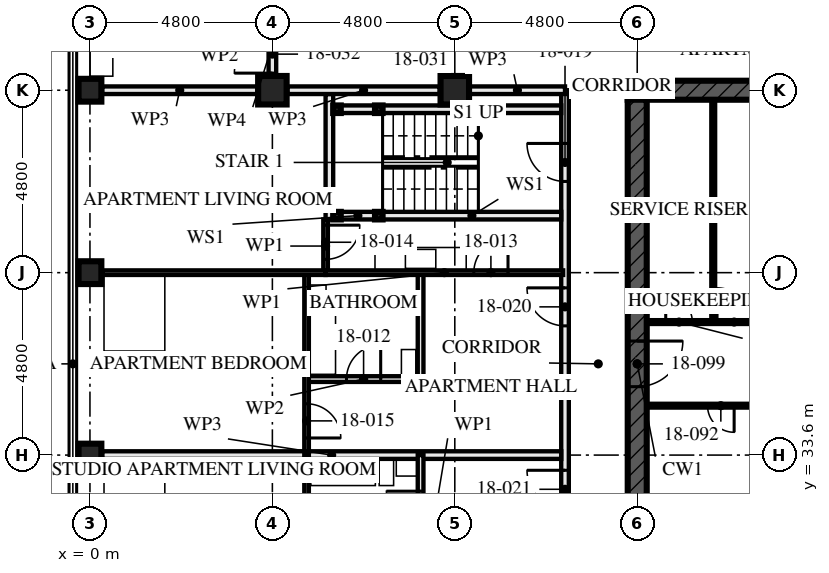
"""IFC4 building model, lengths in metres.
Left out: names, types, materials, properties, quantities, classifications, styles, units other than length and angle.
Written with IfcOpenShell. Run it as: python <this file> out.ifc"""

import sys

from ifc_helpers import new_model, si_unit, direction, frame, frame_2d, origin, origin_2d, place, context, subcontext, project, spatial, rectangle, hollow_rectangle, extrude, element, fill, save


model = new_model("IFC4")
c1 = context("Model", 3, precision=1e-05, world=origin(), true_north=direction((0.0, 1.0)))
c2 = subcontext(c1, "Body", "Model", "MODEL_VIEW")
j1 = project(units=[si_unit("LENGTHUNIT", "METRE"), si_unit("PLANEANGLEUNIT", "RADIAN")], contexts=[c1])
p1 = place(None, origin())
s1 = spatial("IfcSite", under=j1, at=p1, CompositionType="ELEMENT")
p2 = place(p1, origin())
s2 = spatial("IfcBuilding", under=s1, at=p2, CompositionType="ELEMENT")
p3 = place(p2, frame((0.0, 0.0, 69.0)))
s3 = spatial("IfcBuildingStorey", under=s2, at=p3, CompositionType="ELEMENT", Elevation=69.0)
for number, where, z_axis, x_axis in (
    (1, (0.0, 33.6, 0.0), (0.0, 0.0, 1.0), (1.0, 0.0, 0.0)),
    (2, (0.0, 38.4, 0.0), (0.0, 0.0, 1.0), (1.0, 0.0, 0.0)),
    (3, (0.0, 43.2, 0.0), (0.0, 0.0, 1.0), (0.0, 1.0, 0.0)),
):
    element("IfcColumn", number, at=place(p3, frame(where, z_axis=z_axis, x_axis=x_axis)), inside=s3, PredefinedType="COLUMN", context=c2, shape_type="SweptSolid", body=[
        extrude(hollow_rectangle(XDim=0.6, YDim=0.6, WallThickness=0.08, at=origin_2d()), origin(), (0.0, 0.0, 1.0), 3.5),
    ])
for number, where, z_axis, x_axis in (
    (4, (4.8, 43.2, 0.0), (0.0, 0.0, 1.0), (0.0, 1.0, 0.0)),
    (5, (9.6, 43.2, 0.0), (0.0, 0.0, 1.0), (0.0, 1.0, 0.0)),
):
    element("IfcColumn", number, at=place(p3, frame(where, z_axis=z_axis, x_axis=x_axis)), inside=s3, PredefinedType="COLUMN", context=c2, shape_type="SweptSolid", body=[
        extrude(hollow_rectangle(XDim=0.75, YDim=0.75, WallThickness=0.08, at=origin_2d()), origin(), (0.0, 0.0, 1.0), 3.5),
    ])
p4 = place(p3, frame((29.05, 43.2, -0.17), z_axis=(0.0, 0.0, 1.0), x_axis=(-1.0, 0.0, 0.0)))
e6 = element("IfcWall", 6, at=p4, inside=s3, PredefinedType="SHEAR", context=c2, shape_type="SweptSolid", body=[
    extrude(rectangle(XDim=14.9, YDim=0.5, at=frame_2d((7.45, 0.0))), origin(), (0.0, 0.0, 1.0), 3.5),
])
p5 = place(p4, frame((6.85, 0.0, 0.17)))
e7 = element("IfcOpeningElement", 7, at=p5, cuts=e6, PredefinedType="OPENING", context=c2, shape_type="SweptSolid", body=[
    extrude(rectangle(XDim=1.2, YDim=2.1, at=frame_2d((0.6, 1.05))), frame((0.0, 0.26, 0.0), z_axis=(0.0, -1.0, 0.0), x_axis=(1.0, 0.0, 0.0)), (0.0, 0.0, 1.0), 0.521),
])
p6 = place(p3, frame((14.4, 42.95, -0.17), z_axis=(0.0, 0.0, 1.0), x_axis=(0.0, -1.0, 0.0)))
e8 = element("IfcWall", 8, at=p6, inside=s3, PredefinedType="SHEAR", context=c2, shape_type="SweptSolid", body=[
    extrude(rectangle(XDim=13.9, YDim=0.5, at=frame_2d((6.95, 0.0))), origin(), (0.0, 0.0, 1.0), 3.5),
])
p7 = place(p6, frame((6.35, 0.0, 0.17)))
e9 = element("IfcOpeningElement", 9, at=p7, cuts=e8, PredefinedType="OPENING", context=c2, shape_type="SweptSolid", body=[
    extrude(rectangle(XDim=1.2, YDim=2.1, at=frame_2d((0.6, 1.05))), frame((0.0, 0.26, 0.0), z_axis=(0.0, -1.0, 0.0), x_axis=(1.0, 0.0, 0.0)), (0.0, 0.0, 1.0), 0.521),
])
for number, where, z_axis, x_axis in (
    (10, (6.5, 42.7, 0.0), (0.0, 0.0, 1.0), (1.0, 0.0, 0.0)),
    (11, (6.5, 39.9, 0.0), (0.0, 0.0, 1.0), (1.0, 0.0, 0.0)),
    (12, (7.6, 42.7, 0.0), (0.0, 0.0, 1.0), (1.0, 0.0, 0.0)),
    (13, (7.6, 39.9, 0.0), (0.0, 0.0, 1.0), (1.0, 0.0, 0.0)),
):
    element("IfcColumn", number, at=place(p3, frame(where, z_axis=z_axis, x_axis=x_axis)), inside=s3, PredefinedType="COLUMN", context=c2, shape_type="SweptSolid", body=[
        extrude(hollow_rectangle(XDim=0.2, YDim=0.2, WallThickness=0.008, at=origin_2d()), origin(), (0.0, 0.0, 1.0), 3.33),
    ])
p8 = place(p3, frame((6.6, 42.7, 0.0), z_axis=(0.0, 0.0, 1.0), x_axis=(1.0, 0.0, 0.0)))
e14 = element("IfcWall", 14, at=p8, inside=s3, PredefinedType="SOLIDWALL", context=c2, shape_type="SweptSolid", body=[
    extrude(rectangle(XDim=0.9, YDim=0.2, at=frame_2d((0.45, 0.0))), origin(), (0.0, 0.0, 1.0), 2.99),
])
p9 = place(p3, frame((7.7, 42.7, 0.0), z_axis=(0.0, 0.0, 1.0), x_axis=(1.0, 0.0, 0.0)))
e15 = element("IfcWall", 15, at=p9, inside=s3, PredefinedType="SOLIDWALL", context=c2, shape_type="SweptSolid", body=[
    extrude(rectangle(XDim=4.7, YDim=0.2, at=frame_2d((2.35, 0.0))), origin(), (0.0, 0.0, 1.0), 2.99),
])
p10 = place(p3, frame((6.6, 39.9, 0.0), z_axis=(0.0, 0.0, 1.0), x_axis=(1.0, 0.0, 0.0)))
e16 = element("IfcWall", 16, at=p10, inside=s3, PredefinedType="SOLIDWALL", context=c2, shape_type="SweptSolid", body=[
    extrude(rectangle(XDim=0.9, YDim=0.2, at=frame_2d((0.45, 0.0))), origin(), (0.0, 0.0, 1.0), 2.99),
])
p11 = place(p3, frame((7.7, 39.9, 0.0), z_axis=(0.0, 0.0, 1.0), x_axis=(1.0, 0.0, 0.0)))
e17 = element("IfcWall", 17, at=p11, inside=s3, PredefinedType="SOLIDWALL", context=c2, shape_type="SweptSolid", body=[
    extrude(rectangle(XDim=4.7, YDim=0.2, at=frame_2d((2.35, 0.0))), origin(), (0.0, 0.0, 1.0), 2.99),
])
p12 = place(p3, frame((6.3, 43.1, 0.0), z_axis=(0.0, 0.0, 1.0), x_axis=(0.0, -1.0, 0.0)))
e18 = element("IfcWall", 18, at=p12, inside=s3, PredefinedType="SOLIDWALL", context=c2, shape_type="SweptSolid", body=[
    extrude(rectangle(XDim=3.3, YDim=0.2, at=frame_2d((1.65, 0.0))), origin(), (0.0, 0.0, 1.0), 3.33),
])
p13 = place(p3, frame((5.7, 35.6, 0.0), z_axis=(0.0, 0.0, 1.0), x_axis=(1.0, 0.0, 0.0)))
e19 = element("IfcWall", 19, at=p13, inside=s3, PredefinedType="PARTITIONING", context=c2, shape_type="SweptSolid", body=[
    extrude(rectangle(XDim=3.0, YDim=0.15, at=frame_2d((1.5, 0.0))), origin(), (0.0, 0.0, 1.0), 3.33),
])
p14 = place(p13, frame((1.05, 0.0, 0.0)))
e20 = element("IfcOpeningElement", 20, at=p14, cuts=e19, PredefinedType="OPENING", context=c2, shape_type="SweptSolid", body=[
    extrude(rectangle(XDim=0.9, YDim=2.1, at=frame_2d((0.45, 1.05))), frame((0.0, 0.085, 0.0), z_axis=(0.0, -1.0, 0.0), x_axis=(1.0, 0.0, 0.0)), (0.0, 0.0, 1.0), 0.171),
])
p15 = place(p3, frame((8.7, 38.4, 0.0), z_axis=(0.0, 0.0, 1.0), x_axis=(0.0, -1.0, 0.0)))
e21 = element("IfcWall", 21, at=p15, inside=s3, PredefinedType="PARTITIONING", context=c2, shape_type="SweptSolid", body=[
    extrude(rectangle(XDim=2.8, YDim=0.15, at=frame_2d((1.4, 0.0))), origin(), (0.0, 0.0, 1.0), 3.33),
])
p16 = place(p3, frame((6.2, 38.4, 0.0), z_axis=(0.0, 0.0, 1.0), x_axis=(1.0, 0.0, 0.0)))
e22 = element("IfcWall", 22, at=p16, inside=s3, PredefinedType="PARTITIONING", context=c2, shape_type="SweptSolid", body=[
    extrude(rectangle(XDim=6.25, YDim=0.12, at=frame_2d((3.125, 0.0))), origin(), (0.0, 0.0, 1.0), 2.55),
])
p17 = place(p16, frame((3.9, 0.0, 0.0)))
e23 = element("IfcOpeningElement", 23, at=p17, cuts=e22, PredefinedType="OPENING", context=c2, shape_type="SweptSolid", body=[
    extrude(rectangle(XDim=0.9, YDim=2.1, at=frame_2d((0.45, 1.05))), frame((0.0, 0.071, 0.0), z_axis=(0.0, -1.0, 0.0), x_axis=(1.0, 0.0, 0.0)), (0.0, 0.0, 1.0), 0.141),
])
p18 = place(p3, frame((6.2, 39.8, 0.0), z_axis=(0.0, 0.0, 1.0), x_axis=(0.0, -1.0, 0.0)))
e24 = element("IfcWall", 24, at=p18, inside=s3, PredefinedType="PARTITIONING", context=c2, shape_type="SweptSolid", body=[
    extrude(rectangle(XDim=1.4, YDim=0.12, at=frame_2d((0.7, 0.0))), origin(), (0.0, 0.0, 1.0), 3.33),
])
p19 = place(p18, frame((0.15, 0.0, 0.0)))
e25 = element("IfcOpeningElement", 25, at=p19, cuts=e24, PredefinedType="OPENING", context=c2, shape_type="SweptSolid", body=[
    extrude(rectangle(XDim=0.9, YDim=2.1, at=frame_2d((0.45, 1.05))), frame((0.0, 0.071, 0.0), z_axis=(0.0, -1.0, 0.0), x_axis=(1.0, 0.0, 0.0)), (0.0, 0.0, 1.0), 0.141),
])
p20 = place(p3, frame((5.7, 38.4, 0.0), z_axis=(0.0, 0.0, 1.0), x_axis=(0.0, -1.0, 0.0)))
e26 = element("IfcWall", 26, at=p20, inside=s3, PredefinedType="PARTITIONING", context=c2, shape_type="SweptSolid", body=[
    extrude(rectangle(XDim=4.8, YDim=0.12, at=frame_2d((2.4, 0.0))), origin(), (0.0, 0.0, 1.0), 3.33),
])
p21 = place(p20, frame((3.45, 0.0, 0.0)))
e27 = element("IfcOpeningElement", 27, at=p21, cuts=e26, PredefinedType="OPENING", context=c2, shape_type="SweptSolid", body=[
    extrude(rectangle(XDim=0.9, YDim=2.1, at=frame_2d((0.45, 1.05))), frame((0.0, 0.071, 0.0), z_axis=(0.0, -1.0, 0.0), x_axis=(1.0, 0.0, 0.0)), (0.0, 0.0, 1.0), 0.141),
])
p22 = place(p3, frame((0.32, 38.4, 0.0), z_axis=(0.0, 0.0, 1.0), x_axis=(1.0, 0.0, 0.0)))
e28 = element("IfcWall", 28, at=p22, inside=s3, PredefinedType="PARTITIONING", context=c2, shape_type="SweptSolid", body=[
    extrude(rectangle(XDim=5.88, YDim=0.12, at=frame_2d((2.94, 0.0))), origin(), (0.0, 0.0, 1.0), 2.55),
])
p23 = place(p3, frame((0.32, 33.6, 0.0), z_axis=(0.0, 0.0, 1.0), x_axis=(1.0, 0.0, 0.0)))
e29 = element("IfcWall", 29, at=p23, inside=s3, PredefinedType="PARTITIONING", context=c2, shape_type="SweptSolid", body=[
    extrude(rectangle(XDim=12.08, YDim=0.2, at=frame_2d((6.04, 0.0))), origin(), (0.0, 0.0, 1.0), 2.55),
])
p24 = place(p3, frame((8.7, 33.6, 0.0), z_axis=(0.0, 0.0, 1.0), x_axis=(0.0, -1.0, 0.0)))
e30 = element("IfcWall", 30, at=p24, inside=s3, PredefinedType="PARTITIONING", context=c2, shape_type="SweptSolid", body=[
    extrude(rectangle(XDim=2.8, YDim=0.15, at=frame_2d((1.4, 0.0))), origin(), (0.0, 0.0, 1.0), 3.33),
])
p25 = place(p24, frame((0.95, 0.0, 0.0)))
e31 = element("IfcOpeningElement", 31, at=p25, cuts=e30, PredefinedType="OPENING", context=c2, shape_type="SweptSolid", body=[
    extrude(rectangle(XDim=0.9, YDim=2.1, at=frame_2d((0.45, 1.05))), frame((0.0, 0.085, 0.0), z_axis=(0.0, -1.0, 0.0), x_axis=(1.0, 0.0, 0.0)), (0.0, 0.0, 1.0), 0.171),
])
p26 = place(p3, frame((5.7, 33.6, 0.0), z_axis=(0.0, 0.0, 1.0), x_axis=(0.0, -1.0, 0.0)))
e32 = element("IfcWall", 32, at=p26, inside=s3, PredefinedType="PARTITIONING", context=c2, shape_type="SweptSolid", body=[
    extrude(rectangle(XDim=4.8, YDim=0.12, at=frame_2d((2.4, 0.0))), origin(), (0.0, 0.0, 1.0), 3.33),
])
p27 = place(p26, frame((3.45, 0.0, 0.0)))
e33 = element("IfcOpeningElement", 33, at=p27, cuts=e32, PredefinedType="OPENING", context=c2, shape_type="SweptSolid", body=[
    extrude(rectangle(XDim=0.9, YDim=2.1, at=frame_2d((0.45, 1.05))), frame((0.0, 0.071, 0.0), z_axis=(0.0, -1.0, 0.0), x_axis=(1.0, 0.0, 0.0)), (0.0, 0.0, 1.0), 0.141),
])
p28 = place(p3, frame((12.5, 43.2, 0.0), z_axis=(0.0, 0.0, 1.0), x_axis=(0.0, -1.0, 0.0)))
e34 = element("IfcWall", 34, at=p28, inside=s3, PredefinedType="PARTITIONING", context=c2, shape_type="SweptSolid", body=[
    extrude(rectangle(XDim=14.4, YDim=0.2, at=frame_2d((7.2, 0.0))), origin(), (0.0, 0.0, 1.0), 2.55),
])
p29 = place(p28, frame((1.4, 0.0, 0.0)))
e35 = element("IfcOpeningElement", 35, at=p29, cuts=e34, PredefinedType="OPENING", context=c2, shape_type="SweptSolid", body=[
    extrude(rectangle(XDim=1.0, YDim=2.1, at=frame_2d((0.5, 1.05))), frame((0.0, 0.111, 0.0), z_axis=(0.0, -1.0, 0.0), x_axis=(1.0, 0.0, 0.0)), (0.0, 0.0, 1.0), 0.221),
])
p30 = place(p28, frame((5.2, 0.0, 0.0)))
e36 = element("IfcOpeningElement", 36, at=p30, cuts=e34, PredefinedType="OPENING", context=c2, shape_type="SweptSolid", body=[
    extrude(rectangle(XDim=1.0, YDim=2.1, at=frame_2d((0.5, 1.05))), frame((0.0, 0.111, 0.0), z_axis=(0.0, -1.0, 0.0), x_axis=(1.0, 0.0, 0.0)), (0.0, 0.0, 1.0), 0.221),
])
p31 = place(p28, frame((10.0, 0.0, 0.0)))
e37 = element("IfcOpeningElement", 37, at=p31, cuts=e34, PredefinedType="OPENING", context=c2, shape_type="SweptSolid", body=[
    extrude(rectangle(XDim=1.0, YDim=2.1, at=frame_2d((0.5, 1.05))), frame((0.0, 0.111, 0.0), z_axis=(0.0, -1.0, 0.0), x_axis=(1.0, 0.0, 0.0)), (0.0, 0.0, 1.0), 0.221),
])
p32 = place(p3, frame((4.8, 45.2, 0.0), z_axis=(0.0, 0.0, 1.0), x_axis=(0.0, -1.0, 0.0)))
e38 = element("IfcWall", 38, at=p32, inside=s3, PredefinedType="PARTITIONING", context=c2, shape_type="SweptSolid", body=[
    extrude(rectangle(XDim=1.605, YDim=0.2, at=frame_2d((0.802, 0.0))), origin(), (0.0, 0.0, 1.0), 3.33),
])
p33 = place(p32, frame((0.55, 0.0, 0.0)))
e39 = element("IfcOpeningElement", 39, at=p33, cuts=e38, PredefinedType="OPENING", context=c2, shape_type="SweptSolid", body=[
    extrude(rectangle(XDim=1.0, YDim=2.1, at=frame_2d((0.5, 1.05))), frame((0.0, 0.111, 0.0), z_axis=(0.0, -1.0, 0.0), x_axis=(1.0, 0.0, 0.0)), (0.0, 0.0, 1.0), 0.221),
])
p34 = place(p3, frame((16.4, 37.15, 0.0), z_axis=(0.0, 0.0, 1.0), x_axis=(0.0, 1.0, 0.0)))
e40 = element("IfcWall", 40, at=p34, inside=s3, PredefinedType="SOLIDWALL", context=c2, shape_type="SweptSolid", body=[
    extrude(rectangle(XDim=5.8, YDim=0.1, at=frame_2d((2.9, 0.0))), origin(), (0.0, 0.0, 1.0), 3.33),
])
p35 = place(p3, frame((14.65, 34.9, 0.0), z_axis=(0.0, 0.0, 1.0), x_axis=(1.0, 0.0, 0.0)))
e41 = element("IfcWall", 41, at=p35, inside=s3, PredefinedType="SOLIDWALL", context=c2, shape_type="SweptSolid", body=[
    extrude(rectangle(XDim=5.9, YDim=0.1, at=frame_2d((2.95, 0.0))), origin(), (0.0, 0.0, 1.0), 3.33),
])
p36 = place(p35, frame((1.6, 0.0, 0.0)))
e42 = element("IfcOpeningElement", 42, at=p36, cuts=e41, PredefinedType="OPENING", context=c2, shape_type="SweptSolid", body=[
    extrude(rectangle(XDim=0.7, YDim=2.1, at=frame_2d((0.35, 1.05))), frame((0.0, 0.061, 0.0), z_axis=(0.0, -1.0, 0.0), x_axis=(1.0, 0.0, 0.0)), (0.0, 0.0, 1.0), 0.121),
])
p37 = place(p3, frame((14.65, 37.1, 0.0), z_axis=(0.0, 0.0, 1.0), x_axis=(1.0, 0.0, 0.0)))
e43 = element("IfcWall", 43, at=p37, inside=s3, PredefinedType="SOLIDWALL", context=c2, shape_type="SweptSolid", body=[
    extrude(rectangle(XDim=5.9, YDim=0.1, at=frame_2d((2.95, 0.0))), origin(), (0.0, 0.0, 1.0), 3.33),
])
p38 = place(p37, frame((0.5, 0.0, 0.0)))
e44 = element("IfcOpeningElement", 44, at=p38, cuts=e43, PredefinedType="OPENING", context=c2, shape_type="SweptSolid", body=[
    extrude(rectangle(XDim=0.7, YDim=2.1, at=frame_2d((0.35, 1.05))), frame((0.0, 0.061, 0.0), z_axis=(0.0, -1.0, 0.0), x_axis=(1.0, 0.0, 0.0)), (0.0, 0.0, 1.0), 0.121),
])
p39 = place(p37, frame((1.85, 0.0, 0.0)))
e45 = element("IfcOpeningElement", 45, at=p39, cuts=e43, PredefinedType="OPENING", context=c2, shape_type="SweptSolid", body=[
    extrude(rectangle(XDim=0.9, YDim=2.1, at=frame_2d((0.45, 1.05))), frame((0.0, 0.061, 0.0), z_axis=(0.0, -1.0, 0.0), x_axis=(1.0, 0.0, 0.0)), (0.0, 0.0, 1.0), 0.121),
])
p40 = place(p3, frame((12.5, 43.2, 0.0), z_axis=(0.0, 0.0, 1.0), x_axis=(-1.0, 0.0, 0.0)))
e46 = element("IfcWall", 46, at=p40, inside=s3, PredefinedType="PARTITIONING", context=c2, shape_type="SweptSolid", body=[
    extrude(rectangle(XDim=2.505, YDim=0.2, at=frame_2d((1.252, 0.0))), origin(), (0.0, 0.0, 1.0), 2.32),
])
p41 = place(p3, frame((9.205, 43.2, 0.0), z_axis=(0.0, 0.0, 1.0), x_axis=(-1.0, 0.0, 0.0)))
e47 = element("IfcWall", 47, at=p41, inside=s3, PredefinedType="PARTITIONING", context=c2, shape_type="SweptSolid", body=[
    extrude(rectangle(XDim=4.01, YDim=0.2, at=frame_2d((2.005, 0.0))), origin(), (0.0, 0.0, 1.0), 2.32),
])
p42 = place(p3, frame((4.405, 43.2, 0.0), z_axis=(0.0, 0.0, 1.0), x_axis=(-1.0, 0.0, 0.0)))
e48 = element("IfcWall", 48, at=p42, inside=s3, PredefinedType="PARTITIONING", context=c2, shape_type="SweptSolid", body=[
    extrude(rectangle(XDim=4.085, YDim=0.2, at=frame_2d((2.042, 0.0))), origin(), (0.0, 0.0, 1.0), 2.32),
])
p43 = place(p14, origin())
e49 = element("IfcDoor", 49, at=p43, inside=s3, OperationType="SINGLE_SWING_LEFT", PredefinedType="DOOR", context=c2, shape_type="SweptSolid", body=[
    extrude(rectangle(XDim=0.9, YDim=2.1, at=frame_2d((0.45, 1.05))), frame((0.0, 0.022, 0.0), z_axis=(0.0, -1.0, 0.0), x_axis=(1.0, 0.0, 0.0)), (0.0, 0.0, 1.0), 0.044),
])
fill(e20, e49)
p44 = place(p17, origin())
e50 = element("IfcDoor", 50, at=p44, inside=s3, OperationType="SINGLE_SWING_LEFT", PredefinedType="DOOR", context=c2, shape_type="SweptSolid", body=[
    extrude(rectangle(XDim=0.9, YDim=2.1, at=frame_2d((0.45, 1.05))), frame((0.0, 0.022, 0.0), z_axis=(0.0, -1.0, 0.0), x_axis=(1.0, 0.0, 0.0)), (0.0, 0.0, 1.0), 0.044),
])
fill(e23, e50)
p45 = place(p19, origin())
e51 = element("IfcDoor", 51, at=p45, inside=s3, OperationType="SINGLE_SWING_RIGHT", PredefinedType="DOOR", context=c2, shape_type="SweptSolid", body=[
    extrude(rectangle(XDim=0.9, YDim=2.1, at=frame_2d((0.45, 1.05))), frame((0.0, 0.022, 0.0), z_axis=(0.0, -1.0, 0.0), x_axis=(1.0, 0.0, 0.0)), (0.0, 0.0, 1.0), 0.044),
])
fill(e25, e51)
p46 = place(p21, origin())
e52 = element("IfcDoor", 52, at=p46, inside=s3, OperationType="SINGLE_SWING_LEFT", PredefinedType="DOOR", context=c2, shape_type="SweptSolid", body=[
    extrude(rectangle(XDim=0.9, YDim=2.1, at=frame_2d((0.45, 1.05))), frame((0.0, 0.022, 0.0), z_axis=(0.0, -1.0, 0.0), x_axis=(1.0, 0.0, 0.0)), (0.0, 0.0, 1.0), 0.044),
])
fill(e27, e52)
p47 = place(p25, frame((0.9, 0.0, 0.0), z_axis=(0.0, 0.0, 1.0), x_axis=(-1.0, 0.0, 0.0)))
e53 = element("IfcDoor", 53, at=p47, inside=s3, OperationType="SINGLE_SWING_LEFT", PredefinedType="DOOR", context=c2, shape_type="SweptSolid", body=[
    extrude(rectangle(XDim=0.9, YDim=2.1, at=frame_2d((0.45, 1.05))), frame((0.0, 0.022, 0.0), z_axis=(0.0, -1.0, 0.0), x_axis=(1.0, 0.0, 0.0)), (0.0, 0.0, 1.0), 0.044),
])
fill(e31, e53)
p48 = place(p29, frame((1.0, 0.0, 0.0), z_axis=(0.0, 0.0, 1.0), x_axis=(-1.0, 0.0, 0.0)))
e54 = element("IfcDoor", 54, at=p48, inside=s3, OperationType="SINGLE_SWING_LEFT", PredefinedType="DOOR", context=c2, shape_type="SweptSolid", body=[
    extrude(rectangle(XDim=1.0, YDim=2.1, at=frame_2d((0.5, 1.05))), frame((0.0, 0.032, 0.0), z_axis=(0.0, -1.0, 0.0), x_axis=(1.0, 0.0, 0.0)), (0.0, 0.0, 1.0), 0.064),
])
fill(e35, e54)
p49 = place(p30, frame((1.0, 0.0, 0.0), z_axis=(0.0, 0.0, 1.0), x_axis=(-1.0, 0.0, 0.0)))
e55 = element("IfcDoor", 55, at=p49, inside=s3, OperationType="SINGLE_SWING_LEFT", PredefinedType="DOOR", context=c2, shape_type="SweptSolid", body=[
    extrude(rectangle(XDim=1.0, YDim=2.1, at=frame_2d((0.5, 1.05))), frame((0.0, 0.027, 0.0), z_axis=(0.0, -1.0, 0.0), x_axis=(1.0, 0.0, 0.0)), (0.0, 0.0, 1.0), 0.054),
])
fill(e36, e55)
p50 = place(p31, frame((1.0, 0.0, 0.0), z_axis=(0.0, 0.0, 1.0), x_axis=(-1.0, 0.0, 0.0)))
e56 = element("IfcDoor", 56, at=p50, inside=s3, OperationType="SINGLE_SWING_LEFT", PredefinedType="DOOR", context=c2, shape_type="SweptSolid", body=[
    extrude(rectangle(XDim=1.0, YDim=2.1, at=frame_2d((0.5, 1.05))), frame((0.0, 0.027, 0.0), z_axis=(0.0, -1.0, 0.0), x_axis=(1.0, 0.0, 0.0)), (0.0, 0.0, 1.0), 0.054),
])
fill(e37, e56)
p51 = place(p33, frame((1.0, 0.0, 0.0), z_axis=(0.0, 0.0, 1.0), x_axis=(-1.0, 0.0, 0.0)))
e57 = element("IfcDoor", 57, at=p51, inside=s3, OperationType="SINGLE_SWING_RIGHT", PredefinedType="DOOR", context=c2, shape_type="SweptSolid", body=[
    extrude(rectangle(XDim=1.0, YDim=2.1, at=frame_2d((0.5, 1.05))), frame((0.0, 0.027, 0.0), z_axis=(0.0, -1.0, 0.0), x_axis=(1.0, 0.0, 0.0)), (0.0, 0.0, 1.0), 0.054),
])
fill(e39, e57)
p52 = place(p36, frame((0.7, 0.0, 0.0), z_axis=(0.0, 0.0, 1.0), x_axis=(-1.0, 0.0, 0.0)))
e58 = element("IfcDoor", 58, at=p52, inside=s3, OperationType="SINGLE_SWING_RIGHT", PredefinedType="DOOR", context=c2, shape_type="SweptSolid", body=[
    extrude(rectangle(XDim=0.7, YDim=2.1, at=frame_2d((0.35, 1.05))), frame((0.0, 0.027, 0.0), z_axis=(0.0, -1.0, 0.0), x_axis=(1.0, 0.0, 0.0)), (0.0, 0.0, 1.0), 0.054),
])
fill(e42, e58)
p53 = place(p38, origin())
e59 = element("IfcDoor", 59, at=p53, inside=s3, OperationType="SINGLE_SWING_RIGHT", PredefinedType="DOOR", context=c2, shape_type="SweptSolid", body=[
    extrude(rectangle(XDim=0.7, YDim=2.1, at=frame_2d((0.35, 1.05))), frame((0.0, 0.027, 0.0), z_axis=(0.0, -1.0, 0.0), x_axis=(1.0, 0.0, 0.0)), (0.0, 0.0, 1.0), 0.054),
])
fill(e44, e59)
p54 = place(p39, origin())
e60 = element("IfcDoor", 60, at=p54, inside=s3, OperationType="SINGLE_SWING_RIGHT", PredefinedType="DOOR", context=c2, shape_type="SweptSolid", body=[
    extrude(rectangle(XDim=0.9, YDim=2.1, at=frame_2d((0.45, 1.05))), frame((0.0, 0.027, 0.0), z_axis=(0.0, -1.0, 0.0), x_axis=(1.0, 0.0, 0.0)), (0.0, 0.0, 1.0), 0.054),
])
fill(e45, e60)
p55 = place(p7, origin())
e61 = element("IfcDoor", 61, at=p55, inside=s3, OperationType="SINGLE_SWING_LEFT", PredefinedType="DOOR", context=c2, shape_type="SweptSolid", body=[
    extrude(rectangle(XDim=1.2, YDim=2.1, at=frame_2d((0.6, 1.05))), frame((0.0, 0.027, 0.0), z_axis=(0.0, -1.0, 0.0), x_axis=(1.0, 0.0, 0.0)), (0.0, 0.0, 1.0), 0.054),
])
fill(e9, e61)
save(model, sys.argv[1])
